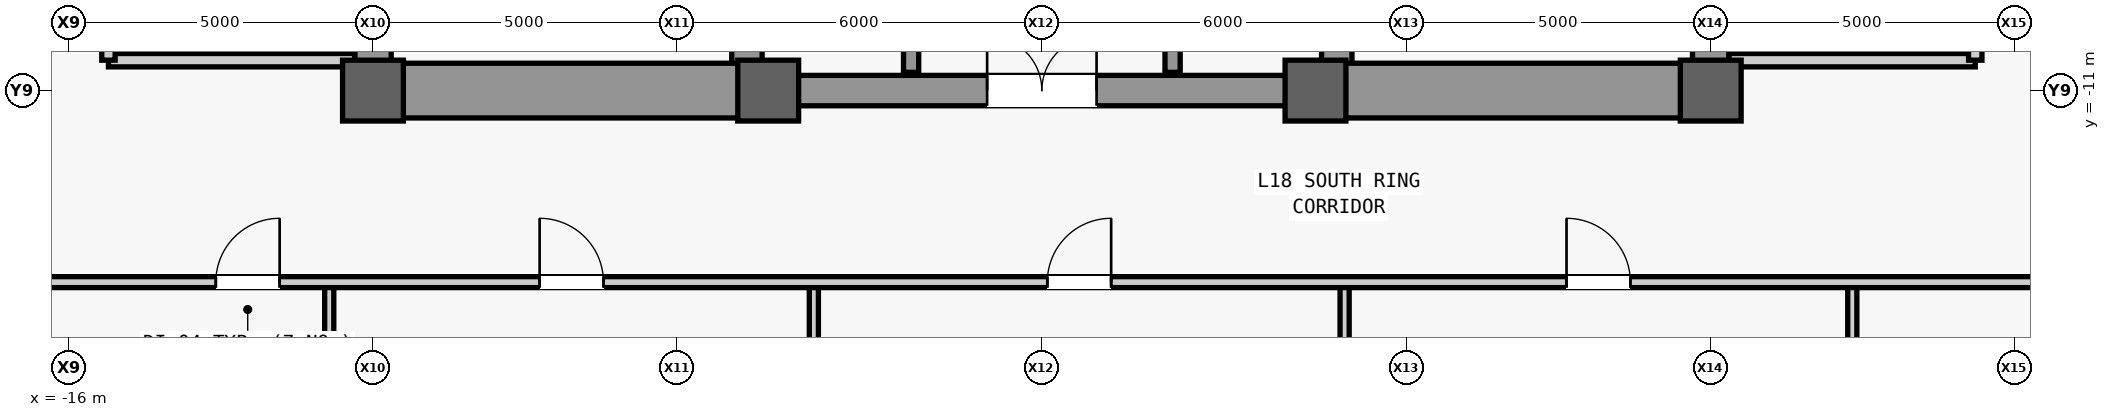
"""IFC4 building model, lengths in metres.
Left out: names, types, materials, properties, quantities, classifications, styles, units other than length and angle.
Written with IfcOpenShell. Run it as: python <this file> out.ifc"""

import sys

from ifc_helpers import new_model, si_unit, direction, frame, frame_2d, origin, origin_2d, place, context, subcontext, project, spatial, rectangle, extrude, source, transform, mapped, element, fill, save


model = new_model("IFC4")
c1 = context("Model", 3, precision=1e-05, world=origin(), true_north=direction((0.0, 1.0)))
c2 = subcontext(c1, "Body", "Model", "MODEL_VIEW")
j1 = project(units=[si_unit("LENGTHUNIT", "METRE"), si_unit("PLANEANGLEUNIT", "RADIAN")], contexts=[c1])
p1 = place(None, origin())
s1 = spatial("IfcSite", under=j1, at=p1, CompositionType="ELEMENT")
p2 = place(p1, origin())
s2 = spatial("IfcBuilding", under=s1, at=p2, CompositionType="ELEMENT")
p3 = place(p2, frame((0.0, 0.0, 83.0)))
s3 = spatial("IfcBuildingStorey", under=s2, at=p3, CompositionType="ELEMENT", Elevation=83.0)
m1 = source(origin(), c2, "Body", "SweptSolid", [
    extrude(rectangle(XDim=22.0, YDim=0.6, at=frame_2d((11.0, 0.0))), origin(), (0.0, 0.0, 1.0), 3.94),
])
p4 = place(p3, frame((-11.0, -11.0, 0.0), z_axis=(0.0, 0.0, 1.0), x_axis=(0.0, 1.0, 0.0)))
e1 = element("IfcWall", 1, at=p4, inside=s3, PredefinedType="SHEAR", context=c2, shape_type="MappedRepresentation", body=[
    mapped(m1, transform((0.0, 0.0, 0.0), scale=1.0)),
])
m2 = source(origin(), c2, "Body", "SweptSolid", [
    extrude(rectangle(XDim=1.1, YDim=2.2, at=frame_2d((0.55, 1.1))), frame((0.0, 0.31, 0.0), z_axis=(0.0, -1.0, 0.0), x_axis=(1.0, 0.0, 0.0)), (0.0, 0.0, 1.0), 0.62),
])
p5 = place(p4, frame((0.8, 0.0, 0.0)))
e2 = element("IfcOpeningElement", 2, at=p5, cuts=e1, PredefinedType="OPENING", context=c2, shape_type="MappedRepresentation", body=[
    mapped(m2, transform((0.0, 0.0, 0.0), scale=1.0)),
])
p6 = place(p4, frame((12.5, 0.0, 0.0)))
e3 = element("IfcOpeningElement", 3, at=p6, cuts=e1, PredefinedType="OPENING", context=c2, shape_type="MappedRepresentation", body=[
    mapped(m2, transform((0.0, 0.0, 0.0), scale=1.0)),
])
m3 = source(origin(), c2, "Body", "SweptSolid", [
    extrude(rectangle(XDim=0.9, YDim=2.15, at=frame_2d((0.45, 1.075))), frame((0.0, 0.31, 0.0), z_axis=(0.0, -1.0, 0.0), x_axis=(1.0, 0.0, 0.0)), (0.0, 0.0, 1.0), 0.62),
])
p7 = place(p4, frame((6.85, 0.0, 0.0)))
e4 = element("IfcOpeningElement", 4, at=p7, cuts=e1, PredefinedType="OPENING", context=c2, shape_type="MappedRepresentation", body=[
    mapped(m3, transform((0.0, 0.0, 0.0), scale=1.0)),
])
m4 = source(origin(), c2, "Body", "SweptSolid", [
    extrude(rectangle(XDim=1.3, YDim=2.3, at=frame_2d((0.65, 1.15))), frame((0.0, 0.31, 0.0), z_axis=(0.0, -1.0, 0.0), x_axis=(1.0, 0.0, 0.0)), (0.0, 0.0, 1.0), 0.62),
])
p8 = place(p4, frame((2.7, 0.0, 0.0)))
e5 = element("IfcOpeningElement", 5, at=p8, cuts=e1, PredefinedType="OPENING", context=c2, shape_type="MappedRepresentation", body=[
    mapped(m4, transform((0.0, 0.0, 0.0), scale=1.0)),
])
p9 = place(p3, frame((11.0, -11.0, 0.0), z_axis=(0.0, 0.0, 1.0), x_axis=(0.0, 1.0, 0.0)))
e6 = element("IfcWall", 6, at=p9, inside=s3, PredefinedType="SHEAR", context=c2, shape_type="MappedRepresentation", body=[
    mapped(m1, transform((0.0, 0.0, 0.0), scale=1.0)),
])
p10 = place(p9, frame((0.8, 0.0, 0.0)))
e7 = element("IfcOpeningElement", 7, at=p10, cuts=e6, PredefinedType="OPENING", context=c2, shape_type="MappedRepresentation", body=[
    mapped(m2, transform((0.0, 0.0, 0.0), scale=1.0)),
])
p11 = place(p9, frame((6.2, 0.0, 0.0)))
e8 = element("IfcOpeningElement", 8, at=p11, cuts=e6, PredefinedType="OPENING", context=c2, shape_type="MappedRepresentation", body=[
    mapped(m3, transform((0.0, 0.0, 0.0), scale=1.0)),
])
p12 = place(p9, frame((8.05, 0.0, 0.0)))
e9 = element("IfcOpeningElement", 9, at=p12, cuts=e6, PredefinedType="OPENING", context=c2, shape_type="MappedRepresentation", body=[
    mapped(m3, transform((0.0, 0.0, 0.0), scale=1.0)),
])
p13 = place(p9, frame((2.7, 0.0, 0.0)))
e10 = element("IfcOpeningElement", 10, at=p13, cuts=e6, PredefinedType="OPENING", context=c2, shape_type="MappedRepresentation", body=[
    mapped(m4, transform((0.0, 0.0, 0.0), scale=1.0)),
])
p14 = place(p9, frame((13.35, 0.0, 0.0)))
e11 = element("IfcOpeningElement", 11, at=p14, cuts=e6, PredefinedType="OPENING", context=c2, shape_type="MappedRepresentation", body=[
    mapped(m4, transform((0.0, 0.0, 0.0), scale=1.0)),
])
m5 = source(origin(), c2, "Body", "SweptSolid", [
    extrude(rectangle(XDim=21.4, YDim=0.5, at=frame_2d((10.7, 0.0))), origin(), (0.0, 0.0, 1.0), 3.94),
])
for number, where, z_axis, x_axis in (
    (12, (-4.85, -10.7, 0.0), (0.0, 0.0, 1.0), (0.0, 1.0, 0.0)),
    (13, (4.85, -10.7, 0.0), (0.0, 0.0, 1.0), (0.0, 1.0, 0.0)),
):
    element("IfcWall", number, at=place(p3, frame(where, z_axis=z_axis, x_axis=x_axis)), inside=s3, PredefinedType="SHEAR", context=c2, shape_type="MappedRepresentation", body=[
        mapped(m5, transform((0.0, 0.0, 0.0), scale=1.0)),
    ])
m6 = source(origin(), c2, "Body", "SweptSolid", [
    extrude(rectangle(XDim=5.85, YDim=0.9, at=frame_2d((2.925, 0.0))), origin(), (0.0, 0.0, 1.0), 3.94),
])
for number, where, z_axis, x_axis in (
    (14, (-10.7, -11.0, 0.0), (0.0, 0.0, 1.0), (1.0, 0.0, 0.0)),
    (15, (4.85, -11.0, 0.0), (0.0, 0.0, 1.0), (1.0, 0.0, 0.0)),
):
    element("IfcWall", number, at=place(p3, frame(where, z_axis=z_axis, x_axis=x_axis)), inside=s3, PredefinedType="SHEAR", context=c2, shape_type="MappedRepresentation", body=[
        mapped(m6, transform((0.0, 0.0, 0.0), scale=1.0)),
    ])
m7 = source(origin(), c2, "Body", "SweptSolid", [
    extrude(rectangle(XDim=9.2, YDim=0.5, at=frame_2d((4.6, 0.0))), origin(), (0.0, 0.0, 1.0), 3.94),
])
p15 = place(p3, frame((-4.6, -11.0, 0.0), z_axis=(0.0, 0.0, 1.0), x_axis=(1.0, 0.0, 0.0)))
e16 = element("IfcWall", 16, at=p15, inside=s3, PredefinedType="SHEAR", context=c2, shape_type="MappedRepresentation", body=[
    mapped(m7, transform((0.0, 0.0, 0.0), scale=1.0)),
])
m8 = source(origin(), c2, "Body", "SweptSolid", [
    extrude(rectangle(XDim=1.8, YDim=2.25, at=frame_2d((0.9, 1.125))), frame((0.0, 0.26, 0.0), z_axis=(0.0, -1.0, 0.0), x_axis=(1.0, 0.0, 0.0)), (0.0, 0.0, 1.0), 0.52),
])
p16 = place(p15, frame((3.7, 0.0, 0.0)))
e17 = element("IfcOpeningElement", 17, at=p16, cuts=e16, PredefinedType="OPENING", context=c2, shape_type="MappedRepresentation", body=[
    mapped(m8, transform((0.0, 0.0, 0.0), scale=1.0)),
])
m9 = source(origin(), c2, "Body", "SweptSolid", [
    extrude(rectangle(XDim=1.0, YDim=1.0, at=origin_2d()), origin(), (0.0, 0.0, 1.0), 4.2),
])
for number, where, z_axis, x_axis in (
    (18, (-11.0, -11.0, 0.0), (0.0, 0.0, 1.0), (1.0, 0.0, 0.0)),
    (19, (-4.5, -11.0, 0.0), (0.0, 0.0, 1.0), (1.0, 0.0, 0.0)),
    (20, (4.5, -11.0, 0.0), (0.0, 0.0, 1.0), (1.0, 0.0, 0.0)),
    (21, (11.0, -11.0, 0.0), (0.0, 0.0, 1.0), (1.0, 0.0, 0.0)),
):
    element("IfcColumn", number, at=place(p3, frame(where, z_axis=z_axis, x_axis=x_axis)), inside=s3, PredefinedType="COLUMN", context=c2, shape_type="MappedRepresentation", body=[
        mapped(m9, transform((0.0, 0.0, 0.0), scale=1.0)),
    ])
m10 = source(origin(), c2, "Body", "SweptSolid", [
    extrude(rectangle(XDim=4.05, YDim=0.22, at=frame_2d((2.025, 0.0))), origin(), (0.0, 0.0, 1.0), 3.94),
])
p17 = place(p3, frame((-15.35, -10.5, 0.0), z_axis=(0.0, 0.0, 1.0), x_axis=(1.0, 0.0, 0.0)))
e22 = element("IfcWall", 22, at=p17, inside=s3, PredefinedType="PARTITIONING", context=c2, shape_type="MappedRepresentation", body=[
    mapped(m10, transform((0.0, 0.0, 0.0), scale=1.0)),
])
m11 = source(origin(), c2, "Body", "SweptSolid", [
    extrude(rectangle(XDim=4.4, YDim=0.22, at=frame_2d((2.2, 0.0))), origin(), (0.0, 0.0, 1.0), 3.94),
])
p18 = place(p3, frame((-15.35, -10.5, 0.0), z_axis=(0.0, 0.0, 1.0), x_axis=(0.0, 1.0, 0.0)))
e23 = element("IfcWall", 23, at=p18, inside=s3, PredefinedType="PARTITIONING", context=c2, shape_type="MappedRepresentation", body=[
    mapped(m11, transform((0.0, 0.0, 0.0), scale=1.0)),
])
m12 = source(origin(), c2, "Body", "SweptSolid", [
    extrude(rectangle(XDim=1.2, YDim=2.2, at=frame_2d((0.6, 1.1))), frame((0.0, 0.12, 0.0), z_axis=(0.0, -1.0, 0.0), x_axis=(1.0, 0.0, 0.0)), (0.0, 0.0, 1.0), 0.24),
])
p19 = place(p18, frame((1.6, 0.0, 0.0)))
e24 = element("IfcOpeningElement", 24, at=p19, cuts=e23, PredefinedType="OPENING", context=c2, shape_type="MappedRepresentation", body=[
    mapped(m12, transform((0.0, 0.0, 0.0), scale=1.0)),
])
p20 = place(p3, frame((11.3, -10.5, 0.0), z_axis=(0.0, 0.0, 1.0), x_axis=(1.0, 0.0, 0.0)))
e25 = element("IfcWall", 25, at=p20, inside=s3, PredefinedType="PARTITIONING", context=c2, shape_type="MappedRepresentation", body=[
    mapped(m10, transform((0.0, 0.0, 0.0), scale=1.0)),
])
p21 = place(p3, frame((15.35, -10.5, 0.0), z_axis=(0.0, 0.0, 1.0), x_axis=(0.0, 1.0, 0.0)))
e26 = element("IfcWall", 26, at=p21, inside=s3, PredefinedType="PARTITIONING", context=c2, shape_type="MappedRepresentation", body=[
    mapped(m11, transform((0.0, 0.0, 0.0), scale=1.0)),
])
p22 = place(p21, frame((1.6, 0.0, 0.0)))
e27 = element("IfcOpeningElement", 27, at=p22, cuts=e26, PredefinedType="OPENING", context=c2, shape_type="MappedRepresentation", body=[
    mapped(m12, transform((0.0, 0.0, 0.0), scale=1.0)),
])
m13 = source(origin(), c2, "Body", "SweptSolid", [
    extrude(rectangle(XDim=5.4, YDim=0.25, at=frame_2d((2.7, 0.0))), origin(), (0.0, 0.0, 1.0), 3.94),
])
p23 = place(p3, frame((-2.15, -10.7, 0.0), z_axis=(0.0, 0.0, 1.0), x_axis=(0.0, 1.0, 0.0)))
e28 = element("IfcWall", 28, at=p23, inside=s3, PredefinedType="SHEAR", context=c2, shape_type="MappedRepresentation", body=[
    mapped(m13, transform((0.0, 0.0, 0.0), scale=1.0)),
])
m14 = source(origin(), c2, "Body", "SweptSolid", [
    extrude(rectangle(XDim=1.2, YDim=2.3, at=frame_2d((0.6, 1.15))), frame((0.0, 0.135, 0.0), z_axis=(0.0, -1.0, 0.0), x_axis=(1.0, 0.0, 0.0)), (0.0, 0.0, 1.0), 0.27),
])
p24 = place(p23, frame((0.9, 0.0, 0.0)))
e29 = element("IfcOpeningElement", 29, at=p24, cuts=e28, PredefinedType="OPENING", context=c2, shape_type="MappedRepresentation", body=[
    mapped(m14, transform((0.0, 0.0, 0.0), scale=1.0)),
])
p25 = place(p23, frame((3.2, 0.0, 0.0)))
e30 = element("IfcOpeningElement", 30, at=p25, cuts=e28, PredefinedType="OPENING", context=c2, shape_type="MappedRepresentation", body=[
    mapped(m14, transform((0.0, 0.0, 0.0), scale=1.0)),
])
p26 = place(p3, frame((2.15, -10.7, 0.0), z_axis=(0.0, 0.0, 1.0), x_axis=(0.0, 1.0, 0.0)))
e31 = element("IfcWall", 31, at=p26, inside=s3, PredefinedType="SHEAR", context=c2, shape_type="MappedRepresentation", body=[
    mapped(m13, transform((0.0, 0.0, 0.0), scale=1.0)),
])
p27 = place(p26, frame((0.9, 0.0, 0.0)))
e32 = element("IfcOpeningElement", 32, at=p27, cuts=e31, PredefinedType="OPENING", context=c2, shape_type="MappedRepresentation", body=[
    mapped(m14, transform((0.0, 0.0, 0.0), scale=1.0)),
])
p28 = place(p26, frame((3.2, 0.0, 0.0)))
e33 = element("IfcOpeningElement", 33, at=p28, cuts=e31, PredefinedType="OPENING", context=c2, shape_type="MappedRepresentation", body=[
    mapped(m14, transform((0.0, 0.0, 0.0), scale=1.0)),
])
m15 = source(origin(), c2, "Body", "SweptSolid", [
    extrude(rectangle(XDim=17.85, YDim=0.15, at=frame_2d((8.925, 0.0))), origin(), (0.0, 0.0, 1.0), 3.94),
])
for number, where, z_axis, x_axis in (
    (34, (-11.719, -32.0, 0.0), (0.0, 0.0, 1.0), (0.0, 1.0, 0.0)),
    (35, (-3.75, -32.0, 0.0), (0.0, 0.0, 1.0), (0.0, 1.0, 0.0)),
    (36, (4.979, -32.0, 0.0), (0.0, 0.0, 1.0), (0.0, 1.0, 0.0)),
):
    element("IfcWall", number, at=place(p3, frame(where, z_axis=z_axis, x_axis=x_axis)), inside=s3, PredefinedType="PARTITIONING", context=c2, shape_type="MappedRepresentation", body=[
        mapped(m15, transform((0.0, 0.0, 0.0), scale=1.0)),
    ])
p29 = place(p3, frame((13.328, -32.0, 0.0), z_axis=(0.0, 0.0, 1.0), x_axis=(0.0, 1.0, 0.0)))
e37 = element("IfcWall", 37, at=p29, inside=s3, PredefinedType="PARTITIONING", context=c2, shape_type="MappedRepresentation", body=[
    mapped(m15, transform((0.0, 0.0, 0.0), scale=1.0)),
])
m16 = source(origin(), c2, "Body", "SweptSolid", [
    extrude(rectangle(XDim=0.95, YDim=2.15, at=frame_2d((0.475, 1.075))), frame((0.0, 0.085, 0.0), z_axis=(0.0, -1.0, 0.0), x_axis=(1.0, 0.0, 0.0)), (0.0, 0.0, 1.0), 0.17),
])
p30 = place(p29, frame((13.091, 0.0, 0.0)))
e38 = element("IfcOpeningElement", 38, at=p30, cuts=e37, PredefinedType="OPENING", context=c2, shape_type="MappedRepresentation", body=[
    mapped(m16, transform((0.0, 0.0, 0.0), scale=1.0)),
])
m17 = source(origin(), c2, "Body", "SweptSolid", [
    extrude(rectangle(XDim=37.95, YDim=0.18, at=frame_2d((18.975, 0.0))), origin(), (0.0, 0.0, 1.0), 3.94),
])
p31 = place(p3, frame((-18.55, -14.15, 0.0), z_axis=(0.0, 0.0, 1.0), x_axis=(1.0, 0.0, 0.0)))
e39 = element("IfcWall", 39, at=p31, inside=s3, PredefinedType="PARTITIONING", context=c2, shape_type="MappedRepresentation", body=[
    mapped(m17, transform((0.0, 0.0, 0.0), scale=1.0)),
])
m18 = source(origin(), c2, "Body", "SweptSolid", [
    extrude(rectangle(XDim=1.05, YDim=2.2, at=frame_2d((0.525, 1.1))), frame((0.0, 0.1, 0.0), z_axis=(0.0, -1.0, 0.0), x_axis=(1.0, 0.0, 0.0)), (0.0, 0.0, 1.0), 0.2),
])
p32 = place(p31, frame((4.966, 0.0, 0.0)))
e40 = element("IfcOpeningElement", 40, at=p32, cuts=e39, PredefinedType="OPENING", context=c2, shape_type="MappedRepresentation", body=[
    mapped(m18, transform((0.0, 0.0, 0.0), scale=1.0)),
])
p33 = place(p31, frame((10.291, 0.0, 0.0)))
e41 = element("IfcOpeningElement", 41, at=p33, cuts=e39, PredefinedType="OPENING", context=c2, shape_type="MappedRepresentation", body=[
    mapped(m18, transform((0.0, 0.0, 0.0), scale=1.0)),
])
p34 = place(p31, frame((18.64, 0.0, 0.0)))
e42 = element("IfcOpeningElement", 42, at=p34, cuts=e39, PredefinedType="OPENING", context=c2, shape_type="MappedRepresentation", body=[
    mapped(m18, transform((0.0, 0.0, 0.0), scale=1.0)),
])
p35 = place(p31, frame((27.178, 0.0, 0.0)))
e43 = element("IfcOpeningElement", 43, at=p35, cuts=e39, PredefinedType="OPENING", context=c2, shape_type="MappedRepresentation", body=[
    mapped(m18, transform((0.0, 0.0, 0.0), scale=1.0)),
])
m19 = source(origin(), c2, "Body", "SweptSolid", [
    extrude(rectangle(XDim=1.8, YDim=2.25, at=frame_2d((0.9, 1.125))), frame((0.0, 0.025, 0.0), z_axis=(0.0, -1.0, 0.0), x_axis=(1.0, 0.0, 0.0)), (0.0, 0.0, 1.0), 0.05),
])
p36 = place(p16, origin())
e44 = element("IfcDoor", 44, at=p36, inside=s3, OperationType="SINGLE_SWING_LEFT", PredefinedType="DOOR", context=c2, shape_type="MappedRepresentation", body=[
    mapped(m19, transform((0.0, 0.0, 0.0), scale=1.0)),
])
fill(e17, e44)
m20 = source(origin(), c2, "Body", "SweptSolid", [
    extrude(rectangle(XDim=1.05, YDim=2.2, at=frame_2d((0.525, 1.1))), frame((0.0, 0.025, 0.0), z_axis=(0.0, -1.0, 0.0), x_axis=(1.0, 0.0, 0.0)), (0.0, 0.0, 1.0), 0.05),
])
p37 = place(p32, origin())
e45 = element("IfcDoor", 45, at=p37, inside=s3, OperationType="SINGLE_SWING_RIGHT", PredefinedType="DOOR", context=c2, shape_type="MappedRepresentation", body=[
    mapped(m20, transform((0.0, 0.0, 0.0), scale=1.0)),
])
fill(e40, e45)
p38 = place(p33, origin())
e46 = element("IfcDoor", 46, at=p38, inside=s3, OperationType="SINGLE_SWING_LEFT", PredefinedType="DOOR", context=c2, shape_type="MappedRepresentation", body=[
    mapped(m20, transform((0.0, 0.0, 0.0), scale=1.0)),
])
fill(e41, e46)
p39 = place(p34, origin())
e47 = element("IfcDoor", 47, at=p39, inside=s3, OperationType="SINGLE_SWING_RIGHT", PredefinedType="DOOR", context=c2, shape_type="MappedRepresentation", body=[
    mapped(m20, transform((0.0, 0.0, 0.0), scale=1.0)),
])
fill(e42, e47)
p40 = place(p35, origin())
e48 = element("IfcDoor", 48, at=p40, inside=s3, OperationType="SINGLE_SWING_LEFT", PredefinedType="DOOR", context=c2, shape_type="MappedRepresentation", body=[
    mapped(m20, transform((0.0, 0.0, 0.0), scale=1.0)),
])
fill(e43, e48)
save(model, sys.argv[1])
